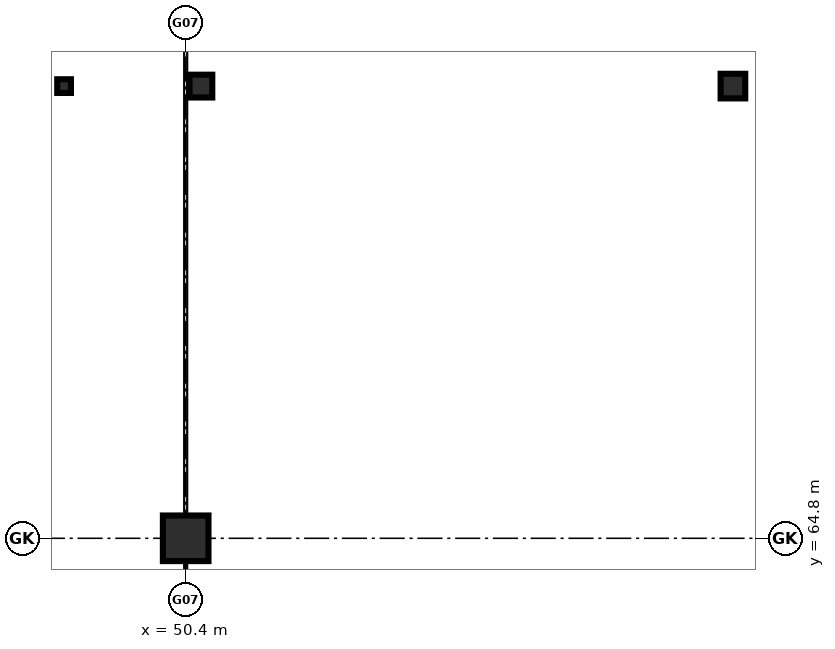
"""IFC4 building model, lengths in metres.
Left out: names, types, materials, properties, quantities, classifications, styles, units other than length and angle.
Written with IfcOpenShell. Run it as: python <this file> out.ifc"""

import sys

from ifc_helpers import new_model, si_unit, direction, frame, origin, origin_2d, place, context, subcontext, project, spatial, rectangle, hollow_rectangle, hollow_circle, i_section, extrude, element, save


model = new_model("IFC4")
c1 = context("Model", 3, precision=1e-05, world=origin(), true_north=direction((0.0, 1.0)))
c2 = subcontext(c1, "Body", "Model", "MODEL_VIEW")
j1 = project(units=[si_unit("LENGTHUNIT", "METRE"), si_unit("PLANEANGLEUNIT", "RADIAN")], contexts=[c1])
p1 = place(None, origin())
s1 = spatial("IfcSite", under=j1, at=p1, CompositionType="ELEMENT")
p2 = place(p1, origin())
s2 = spatial("IfcBuilding", under=s1, at=p2, CompositionType="ELEMENT")
p3 = place(p2, frame((0.0, 0.0, -4.8)))
s3 = spatial("IfcBuildingStorey", under=s2, at=p3, CompositionType="ELEMENT", Elevation=-4.8)
p4 = place(p3, frame((50.4, 64.8, 0.0), z_axis=(0.0, 0.0, 1.0), x_axis=(1.0, 0.0, 0.0)))
e1 = element("IfcColumn", 1, at=p4, inside=s3, PredefinedType="COLUMN", context=c2, shape_type="SweptSolid", body=[
    extrude(rectangle(XDim=0.6, YDim=0.6, at=origin_2d()), origin(), (0.0, 0.0, 1.0), 4.8),
])
p5 = place(p3, frame((57.6, 70.75, 0.0), z_axis=(0.0, 0.0, 1.0), x_axis=(1.0, 0.0, 0.0)))
e2 = element("IfcColumn", 2, at=p5, inside=s3, PredefinedType="COLUMN", context=c2, shape_type="SweptSolid", body=[
    extrude(hollow_circle(Radius=0.162, WallThickness=0.012, at=origin_2d()), origin(), (0.0, 0.0, 1.0), 4.8),
])
p6 = place(p3, frame((50.6, 70.75, 0.0), z_axis=(0.0, 0.0, 1.0), x_axis=(1.0, 0.0, 0.0)))
e3 = element("IfcColumn", 3, at=p6, inside=s3, PredefinedType="COLUMN", context=c2, shape_type="SweptSolid", body=[
    extrude(i_section(OverallWidth=0.3, OverallDepth=0.3, WebThickness=0.011, FlangeThickness=0.019, FilletRadius=0.027, at=origin_2d()), origin(), (0.0, 0.0, 1.0), 4.8),
])
p7 = place(p3, frame((48.8, 70.75, 0.0), z_axis=(0.0, 0.0, 1.0), x_axis=(1.0, 0.0, 0.0)))
e4 = element("IfcColumn", 4, at=p7, inside=s3, PredefinedType="COLUMN", context=c2, shape_type="SweptSolid", body=[
    extrude(hollow_rectangle(XDim=0.18, YDim=0.18, WallThickness=0.008, at=origin_2d()), origin(), (0.0, 0.0, 1.0), 4.8),
])
save(model, sys.argv[1])
